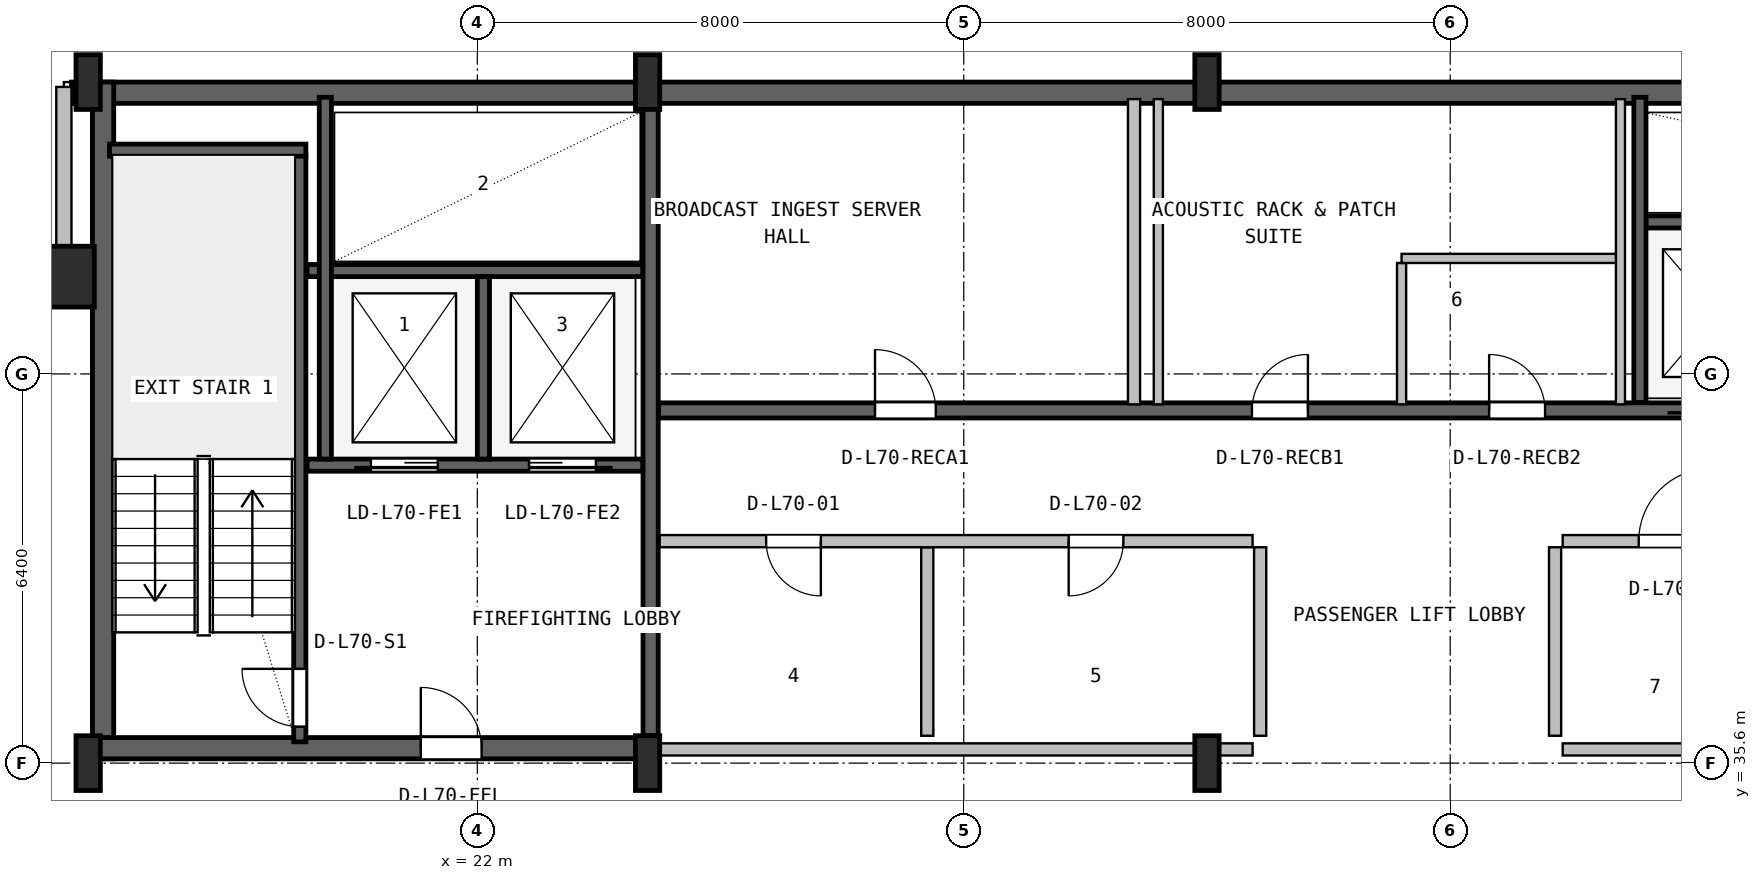
"""IFC4 building model, lengths in metres.
Left out: names, types, materials, properties, quantities, classifications, styles, units other than length and angle.
Written with IfcOpenShell. Run it as: python <this file> out.ifc"""

import sys

from ifc_helpers import new_model, si_unit, direction, frame, frame_2d, origin, origin_2d, place, context, subcontext, project, spatial, rectangle, hollow_rectangle, i_section, extrude, source, transform, mapped, element, fill, save


model = new_model("IFC4")
c1 = context("Model", 3, precision=1e-05, world=origin(), true_north=direction((0.0, 1.0)))
c2 = subcontext(c1, "Body", "Model", "MODEL_VIEW")
j1 = project(units=[si_unit("LENGTHUNIT", "METRE"), si_unit("PLANEANGLEUNIT", "RADIAN")], contexts=[c1])
p1 = place(None, origin())
s1 = spatial("IfcSite", under=j1, at=p1, CompositionType="ELEMENT")
p2 = place(p1, origin())
s2 = spatial("IfcBuilding", under=s1, at=p2, CompositionType="ELEMENT")
p3 = place(p2, frame((0.0, 0.0, 281.2)))
s3 = spatial("IfcBuildingStorey", under=s2, at=p3, CompositionType="ELEMENT", Elevation=281.2)
p4 = place(p3, frame((15.325, 46.625, 0.0), z_axis=(0.0, 0.0, 1.0), x_axis=(1.0, 0.0, 0.0)))
e1 = element("IfcWall", 1, at=p4, inside=s3, PredefinedType="SHEAR", context=c2, shape_type="SweptSolid", body=[
    extrude(rectangle(XDim=37.35, YDim=0.35, at=frame_2d((18.675, 0.0))), origin(), (0.0, 0.0, 1.0), 3.55),
])
p5 = place(p3, frame((15.845, 35.67, 0.0), z_axis=(0.0, 0.0, 1.0), x_axis=(0.0, 1.0, 0.0)))
e2 = element("IfcWall", 2, at=p5, inside=s3, PredefinedType="SHEAR", context=c2, shape_type="SweptSolid", body=[
    extrude(rectangle(XDim=11.13, YDim=0.35, at=frame_2d((5.565, 0.0))), origin(), (0.0, 0.0, 1.0), 3.55),
])
p6 = place(p3, frame((15.67, 35.845, 0.0), z_axis=(0.0, 0.0, 1.0), x_axis=(1.0, 0.0, 0.0)))
e3 = element("IfcWall", 3, at=p6, inside=s3, PredefinedType="SHEAR", context=c2, shape_type="SweptSolid", body=[
    extrude(rectangle(XDim=9.13, YDim=0.35, at=frame_2d((4.565, 0.0))), origin(), (0.0, 0.0, 1.0), 3.55),
])
p7 = place(p6, frame((5.4, 0.0, 0.0)))
e4 = element("IfcOpeningElement", 4, at=p7, cuts=e3, PredefinedType="OPENING", context=c2, shape_type="SweptSolid", body=[
    extrude(rectangle(XDim=1.0, YDim=2.1, at=frame_2d((0.5, 1.05))), frame((0.0, 0.185, 0.0), z_axis=(0.0, -1.0, 0.0), x_axis=(1.0, 0.0, 0.0)), (0.0, 0.0, 1.0), 0.37),
])
m1 = source(origin(), c2, "Body", "SweptSolid", [
    extrude(i_section(OverallWidth=0.4, OverallDepth=0.9, WebThickness=0.016, FlangeThickness=0.028, FilletRadius=0.016, at=origin_2d()), origin(), (0.0, 0.0, 1.0), 3.8),
])
for number, where, z_axis, x_axis in (
    (5, (15.6, 35.6, 0.0), (0.0, 0.0, 1.0), (1.0, 0.0, 0.0)),
    (6, (15.6, 46.8, 0.0), (0.0, 0.0, 1.0), (1.0, 0.0, 0.0)),
    (7, (24.8, 35.6, 0.0), (0.0, 0.0, 1.0), (1.0, 0.0, 0.0)),
    (8, (24.8, 46.8, 0.0), (0.0, 0.0, 1.0), (1.0, 0.0, 0.0)),
    (9, (34.0, 35.6, 0.0), (0.0, 0.0, 1.0), (1.0, 0.0, 0.0)),
    (10, (34.0, 46.8, 0.0), (0.0, 0.0, 1.0), (1.0, 0.0, 0.0)),
):
    element("IfcColumn", number, at=place(p3, frame(where, z_axis=z_axis, x_axis=x_axis)), inside=s3, PredefinedType="COLUMN", context=c2, shape_type="MappedRepresentation", body=[
        mapped(m1, transform((0.0, 0.0, 0.0), x_axis=(1.0, 0.0, 0.0), y_axis=(0.0, 1.0, 0.0), z_axis=(0.0, 0.0, 1.0), scale=1.0)),
    ])
m2 = source(origin(), c2, "Body", "SweptSolid", [
    extrude(hollow_rectangle(XDim=1.0, YDim=1.0, WallThickness=0.04, at=origin_2d()), origin(), (0.0, 0.0, 1.0), 3.8),
])
p8 = place(p3, frame((15.2, 43.6, 0.0), z_axis=(0.0, 0.0, 1.0), x_axis=(1.0, 0.0, 0.0)))
e11 = element("IfcColumn", 11, at=p8, inside=s3, PredefinedType="COLUMN", context=c2, shape_type="MappedRepresentation", body=[
    mapped(m2, transform((0.0, 0.0, 0.0), x_axis=(1.0, 0.0, 0.0), y_axis=(0.0, 1.0, 0.0), z_axis=(0.0, 0.0, 1.0), scale=1.0)),
])
p9 = place(p3, frame((12.08, 43.6, 0.0), z_axis=(0.0, 0.0, 1.0), x_axis=(1.0, 0.0, 0.0)))
e12 = element("IfcWall", 12, at=p9, inside=s3, PredefinedType="SOLIDWALL", context=c2, shape_type="SweptSolid", body=[
    extrude(rectangle(XDim=2.99, YDim=0.25, at=frame_2d((1.495, 0.0))), origin(), (0.0, 0.0, 1.0), 3.53),
])
p10 = place(p3, frame((15.2, 43.52, 0.0), z_axis=(0.0, 0.0, 1.0), x_axis=(0.0, 1.0, 0.0)))
e13 = element("IfcWall", 13, at=p10, inside=s3, PredefinedType="SOLIDWALL", context=c2, shape_type="SweptSolid", body=[
    extrude(rectangle(XDim=3.2, YDim=0.25, at=frame_2d((1.6, 0.0))), origin(), (0.0, 0.0, 1.0), 3.171),
])
p11 = place(p3, frame((19.08, 35.95, 0.0), z_axis=(0.0, 0.0, 1.0), x_axis=(0.0, 1.0, 0.0)))
e14 = element("IfcWall", 14, at=p11, inside=s3, PredefinedType="SHEAR", context=c2, shape_type="SweptSolid", body=[
    extrude(rectangle(XDim=9.65, YDim=0.2, at=frame_2d((4.825, 0.0))), origin(), (0.0, 0.0, 1.0), 3.55),
])
p12 = place(p11, frame((0.25, 0.0, 0.0)))
e15 = element("IfcOpeningElement", 15, at=p12, cuts=e14, PredefinedType="OPENING", context=c2, shape_type="SweptSolid", body=[
    extrude(rectangle(XDim=0.95, YDim=2.1, at=frame_2d((0.475, 1.05))), frame((0.0, 0.11, 0.0), z_axis=(0.0, -1.0, 0.0), x_axis=(1.0, 0.0, 0.0)), (0.0, 0.0, 1.0), 0.22),
])
p13 = place(p3, frame((15.95, 45.68, 0.0), z_axis=(0.0, 0.0, 1.0), x_axis=(1.0, 0.0, 0.0)))
e16 = element("IfcWall", 16, at=p13, inside=s3, PredefinedType="SHEAR", context=c2, shape_type="SweptSolid", body=[
    extrude(rectangle(XDim=3.23, YDim=0.2, at=frame_2d((1.615, 0.0))), origin(), (0.0, 0.0, 1.0), 3.55),
])
p14 = place(p3, frame((24.85, 36.05, 0.0), z_axis=(0.0, 0.0, 1.0), x_axis=(0.0, 1.0, 0.0)))
e17 = element("IfcWall", 17, at=p14, inside=s3, PredefinedType="SHEAR", context=c2, shape_type="SweptSolid", body=[
    extrude(rectangle(XDim=10.45, YDim=0.25, at=frame_2d((5.225, 0.0))), origin(), (0.0, 0.0, 1.0), 3.55),
])
p15 = place(p3, frame((19.2, 40.5, 0.0), z_axis=(0.0, 0.0, 1.0), x_axis=(1.0, 0.0, 0.0)))
e18 = element("IfcWall", 18, at=p15, inside=s3, PredefinedType="SHEAR", context=c2, shape_type="SweptSolid", body=[
    extrude(rectangle(XDim=5.52, YDim=0.2, at=frame_2d((2.76, 0.0))), origin(), (0.0, 0.0, 1.0), 3.55),
])
p16 = place(p15, frame((1.05, 0.0, 0.0)))
e19 = element("IfcOpeningElement", 19, at=p16, cuts=e18, PredefinedType="OPENING", context=c2, shape_type="SweptSolid", body=[
    extrude(rectangle(XDim=1.1, YDim=2.18, at=frame_2d((0.55, 1.09))), frame((0.0, 0.11, 0.0), z_axis=(0.0, -1.0, 0.0), x_axis=(1.0, 0.0, 0.0)), (0.0, 0.0, 1.0), 0.22),
])
p17 = place(p15, frame((3.65, 0.0, 0.0)))
e20 = element("IfcOpeningElement", 20, at=p17, cuts=e18, PredefinedType="OPENING", context=c2, shape_type="SweptSolid", body=[
    extrude(rectangle(XDim=1.1, YDim=2.18, at=frame_2d((0.55, 1.09))), frame((0.0, 0.11, 0.0), z_axis=(0.0, -1.0, 0.0), x_axis=(1.0, 0.0, 0.0)), (0.0, 0.0, 1.0), 0.22),
])
p18 = place(p3, frame((19.2, 43.7, 0.0), z_axis=(0.0, 0.0, 1.0), x_axis=(1.0, 0.0, 0.0)))
e21 = element("IfcWall", 21, at=p18, inside=s3, PredefinedType="SHEAR", context=c2, shape_type="SweptSolid", body=[
    extrude(rectangle(XDim=5.52, YDim=0.2, at=frame_2d((2.76, 0.0))), origin(), (0.0, 0.0, 1.0), 3.55),
])
p19 = place(p3, frame((22.1, 40.6, 0.0), z_axis=(0.0, 0.0, 1.0), x_axis=(0.0, 1.0, 0.0)))
e22 = element("IfcWall", 22, at=p19, inside=s3, PredefinedType="SHEAR", context=c2, shape_type="SweptSolid", body=[
    extrude(rectangle(XDim=3.0, YDim=0.2, at=frame_2d((1.5, 0.0))), origin(), (0.0, 0.0, 1.0), 3.55),
])
p20 = place(p3, frame((19.5, 40.6, 0.0), z_axis=(0.0, 0.0, 1.0), x_axis=(0.0, 1.0, 0.0)))
e23 = element("IfcWall", 23, at=p20, inside=s3, PredefinedType="SHEAR", context=c2, shape_type="SweptSolid", body=[
    extrude(rectangle(XDim=5.95, YDim=0.2, at=frame_2d((2.975, 0.0))), origin(), (0.0, 0.0, 1.0), 3.55),
])
p21 = place(p3, frame((24.98, 41.4, 0.0), z_axis=(0.0, 0.0, 1.0), x_axis=(1.0, 0.0, 0.0)))
e24 = element("IfcWall", 24, at=p21, inside=s3, PredefinedType="SHEAR", context=c2, shape_type="SweptSolid", body=[
    extrude(rectangle(XDim=23.82, YDim=0.25, at=frame_2d((11.91, 0.0))), origin(), (0.0, 0.0, 1.0), 3.55),
])
p22 = place(p21, frame((16.87, 0.0, 0.0)))
e25 = element("IfcOpeningElement", 25, at=p22, cuts=e24, PredefinedType="OPENING", context=c2, shape_type="SweptSolid", body=[
    extrude(rectangle(XDim=1.1, YDim=2.18, at=frame_2d((0.55, 1.09))), frame((0.0, 0.135, 0.0), z_axis=(0.0, -1.0, 0.0), x_axis=(1.0, 0.0, 0.0)), (0.0, 0.0, 1.0), 0.27),
])
p23 = place(p21, frame((19.47, 0.0, 0.0)))
e26 = element("IfcOpeningElement", 26, at=p23, cuts=e24, PredefinedType="OPENING", context=c2, shape_type="SweptSolid", body=[
    extrude(rectangle(XDim=1.1, YDim=2.18, at=frame_2d((0.55, 1.09))), frame((0.0, 0.135, 0.0), z_axis=(0.0, -1.0, 0.0), x_axis=(1.0, 0.0, 0.0)), (0.0, 0.0, 1.0), 0.27),
])
p24 = place(p21, frame((22.07, 0.0, 0.0)))
e27 = element("IfcOpeningElement", 27, at=p24, cuts=e24, PredefinedType="OPENING", context=c2, shape_type="SweptSolid", body=[
    extrude(rectangle(XDim=1.1, YDim=2.18, at=frame_2d((0.55, 1.09))), frame((0.0, 0.135, 0.0), z_axis=(0.0, -1.0, 0.0), x_axis=(1.0, 0.0, 0.0)), (0.0, 0.0, 1.0), 0.27),
])
p25 = place(p21, frame((3.56, 0.0, 0.0)))
e28 = element("IfcOpeningElement", 28, at=p25, cuts=e24, PredefinedType="OPENING", context=c2, shape_type="SweptSolid", body=[
    extrude(rectangle(XDim=1.0, YDim=2.08, at=frame_2d((0.5, 1.04))), frame((0.0, 0.135, 0.0), z_axis=(0.0, -1.0, 0.0), x_axis=(1.0, 0.0, 0.0)), (0.0, 0.0, 1.0), 0.27),
])
p26 = place(p21, frame((9.76, 0.0, 0.0)))
e29 = element("IfcOpeningElement", 29, at=p26, cuts=e24, PredefinedType="OPENING", context=c2, shape_type="SweptSolid", body=[
    extrude(rectangle(XDim=0.92, YDim=2.08, at=frame_2d((0.46, 1.04))), frame((0.0, 0.135, 0.0), z_axis=(0.0, -1.0, 0.0), x_axis=(1.0, 0.0, 0.0)), (0.0, 0.0, 1.0), 0.27),
])
p27 = place(p21, frame((13.66, 0.0, 0.0)))
e30 = element("IfcOpeningElement", 30, at=p27, cuts=e24, PredefinedType="OPENING", context=c2, shape_type="SweptSolid", body=[
    extrude(rectangle(XDim=0.92, YDim=2.08, at=frame_2d((0.46, 1.04))), frame((0.0, 0.135, 0.0), z_axis=(0.0, -1.0, 0.0), x_axis=(1.0, 0.0, 0.0)), (0.0, 0.0, 1.0), 0.27),
])
p28 = place(p3, frame((41.22, 44.5, 0.0), z_axis=(0.0, 0.0, 1.0), x_axis=(1.0, 0.0, 0.0)))
e31 = element("IfcWall", 31, at=p28, inside=s3, PredefinedType="SHEAR", context=c2, shape_type="SweptSolid", body=[
    extrude(rectangle(XDim=7.58, YDim=0.2, at=frame_2d((3.79, 0.0))), origin(), (0.0, 0.0, 1.0), 3.55),
])
p29 = place(p3, frame((41.12, 41.53, 0.0), z_axis=(0.0, 0.0, 1.0), x_axis=(0.0, 1.0, 0.0)))
e32 = element("IfcWall", 32, at=p29, inside=s3, PredefinedType="SHEAR", context=c2, shape_type="SweptSolid", body=[
    extrude(rectangle(XDim=5.02, YDim=0.2, at=frame_2d((2.51, 0.0))), origin(), (0.0, 0.0, 1.0), 3.55),
])
p30 = place(p3, frame((25.0, 35.825, 0.0), z_axis=(0.0, 0.0, 1.0), x_axis=(1.0, 0.0, 0.0)))
e33 = element("IfcWall", 33, at=p30, inside=s3, PredefinedType="PLUMBINGWALL", context=c2, shape_type="SweptSolid", body=[
    extrude(rectangle(XDim=9.75, YDim=0.2, at=frame_2d((4.875, 0.0))), origin(), (0.0, 0.0, 1.0), 2.575),
])
p31 = place(p3, frame((29.4, 36.05, 0.0), z_axis=(0.0, 0.0, 1.0), x_axis=(0.0, 1.0, 0.0)))
e34 = element("IfcWall", 34, at=p31, inside=s3, PredefinedType="PLUMBINGWALL", context=c2, shape_type="SweptSolid", body=[
    extrude(rectangle(XDim=3.1, YDim=0.2, at=frame_2d((1.55, 0.0))), origin(), (0.0, 0.0, 1.0), 3.53),
])
p32 = place(p3, frame((25.0, 39.25, 0.0), z_axis=(0.0, 0.0, 1.0), x_axis=(1.0, 0.0, 0.0)))
e35 = element("IfcWall", 35, at=p32, inside=s3, PredefinedType="PLUMBINGWALL", context=c2, shape_type="SweptSolid", body=[
    extrude(rectangle(XDim=9.75, YDim=0.2, at=frame_2d((4.875, 0.0))), origin(), (0.0, 0.0, 1.0), 3.53),
])
p33 = place(p32, frame((1.75, 0.0, 0.0)))
e36 = element("IfcOpeningElement", 36, at=p33, cuts=e35, PredefinedType="OPENING", context=c2, shape_type="SweptSolid", body=[
    extrude(rectangle(XDim=0.9, YDim=2.06, at=frame_2d((0.45, 1.03))), frame((0.0, 0.11, 0.0), z_axis=(0.0, -1.0, 0.0), x_axis=(1.0, 0.0, 0.0)), (0.0, 0.0, 1.0), 0.22),
])
p34 = place(p32, frame((6.725, 0.0, 0.0)))
e37 = element("IfcOpeningElement", 37, at=p34, cuts=e35, PredefinedType="OPENING", context=c2, shape_type="SweptSolid", body=[
    extrude(rectangle(XDim=0.9, YDim=2.06, at=frame_2d((0.45, 1.03))), frame((0.0, 0.11, 0.0), z_axis=(0.0, -1.0, 0.0), x_axis=(1.0, 0.0, 0.0)), (0.0, 0.0, 1.0), 0.22),
])
p35 = place(p3, frame((34.875, 36.05, 0.0), z_axis=(0.0, 0.0, 1.0), x_axis=(0.0, 1.0, 0.0)))
e38 = element("IfcWall", 38, at=p35, inside=s3, PredefinedType="PLUMBINGWALL", context=c2, shape_type="SweptSolid", body=[
    extrude(rectangle(XDim=3.1, YDim=0.2, at=frame_2d((1.55, 0.0))), origin(), (0.0, 0.0, 1.0), 3.53),
])
p36 = place(p3, frame((39.85, 35.825, 0.0), z_axis=(0.0, 0.0, 1.0), x_axis=(1.0, 0.0, 0.0)))
e39 = element("IfcWall", 39, at=p36, inside=s3, PredefinedType="SOLIDWALL", context=c2, shape_type="SweptSolid", body=[
    extrude(rectangle(XDim=3.7, YDim=0.2, at=frame_2d((1.85, 0.0))), origin(), (0.0, 0.0, 1.0), 2.575),
])
p37 = place(p3, frame((39.85, 39.25, 0.0), z_axis=(0.0, 0.0, 1.0), x_axis=(1.0, 0.0, 0.0)))
e40 = element("IfcWall", 40, at=p37, inside=s3, PredefinedType="SOLIDWALL", context=c2, shape_type="SweptSolid", body=[
    extrude(rectangle(XDim=3.7, YDim=0.2, at=frame_2d((1.85, 0.0))), origin(), (0.0, 0.0, 1.0), 3.53),
])
p38 = place(p37, frame((1.25, 0.0, 0.0)))
e41 = element("IfcOpeningElement", 41, at=p38, cuts=e40, PredefinedType="OPENING", context=c2, shape_type="SweptSolid", body=[
    extrude(rectangle(XDim=1.2, YDim=2.1, at=frame_2d((0.6, 1.05))), frame((0.0, 0.11, 0.0), z_axis=(0.0, -1.0, 0.0), x_axis=(1.0, 0.0, 0.0)), (0.0, 0.0, 1.0), 0.22),
])
p39 = place(p3, frame((39.725, 36.05, 0.0), z_axis=(0.0, 0.0, 1.0), x_axis=(0.0, 1.0, 0.0)))
e42 = element("IfcWall", 42, at=p39, inside=s3, PredefinedType="SOLIDWALL", context=c2, shape_type="SweptSolid", body=[
    extrude(rectangle(XDim=3.1, YDim=0.2, at=frame_2d((1.55, 0.0))), origin(), (0.0, 0.0, 1.0), 3.53),
])
p40 = place(p3, frame((32.8, 41.5, 0.0), z_axis=(0.0, 0.0, 1.0), x_axis=(0.0, 1.0, 0.0)))
e43 = element("IfcWall", 43, at=p40, inside=s3, PredefinedType="SOLIDWALL", context=c2, shape_type="SweptSolid", body=[
    extrude(rectangle(XDim=5.02, YDim=0.2, at=frame_2d((2.51, 0.0))), origin(), (0.0, 0.0, 1.0), 3.53),
])
p41 = place(p3, frame((37.2, 41.5, 0.0), z_axis=(0.0, 0.0, 1.0), x_axis=(0.0, 1.0, 0.0)))
e44 = element("IfcWall", 44, at=p41, inside=s3, PredefinedType="PARTITIONING", context=c2, shape_type="SweptSolid", body=[
    extrude(rectangle(XDim=2.325, YDim=0.15, at=frame_2d((1.163, 0.0))), origin(), (0.0, 0.0, 1.0), 3.53),
])
p42 = place(p3, frame((37.2, 43.9, 0.0), z_axis=(0.0, 0.0, 1.0), x_axis=(1.0, 0.0, 0.0)))
e45 = element("IfcWall", 45, at=p42, inside=s3, PredefinedType="PARTITIONING", context=c2, shape_type="SweptSolid", body=[
    extrude(rectangle(XDim=3.6, YDim=0.15, at=frame_2d((1.8, 0.0))), origin(), (0.0, 0.0, 1.0), 3.53),
])
for number, where, z_axis, x_axis in (
    (46, (40.8, 41.5, 0.0), (0.0, 0.0, 1.0), (0.0, 1.0, 0.0)),
    (47, (33.2, 41.5, 0.0), (0.0, 0.0, 1.0), (0.0, 1.0, 0.0)),
):
    element("IfcWall", number, at=place(p3, frame(where, z_axis=z_axis, x_axis=x_axis)), inside=s3, PredefinedType="PARTITIONING", context=c2, shape_type="SweptSolid", body=[
        extrude(rectangle(XDim=5.02, YDim=0.15, at=frame_2d((2.51, 0.0))), origin(), (0.0, 0.0, 1.0), 3.53),
    ])
m3 = source(origin(), c2, "Body", "SweptSolid", [
    extrude(rectangle(XDim=0.95, YDim=2.1, at=frame_2d((0.475, 1.05))), frame((0.0, 0.025, 0.0), z_axis=(0.0, -1.0, 0.0), x_axis=(1.0, 0.0, 0.0)), (0.0, 0.0, 1.0), 0.05),
])
p43 = place(p12, origin())
e48 = element("IfcDoor", 48, at=p43, inside=s3, OperationType="SINGLE_SWING_RIGHT", PredefinedType="DOOR", context=c2, shape_type="MappedRepresentation", body=[
    mapped(m3, transform((0.0, 0.0, 0.0), x_axis=(1.0, 0.0, 0.0), y_axis=(0.0, 1.0, 0.0), z_axis=(0.0, 0.0, 1.0), scale=1.0)),
])
fill(e15, e48)
m4 = source(origin(), c2, "Body", "SweptSolid", [
    extrude(rectangle(XDim=1.0, YDim=2.1, at=frame_2d((0.5, 1.05))), frame((0.0, 0.025, 0.0), z_axis=(0.0, -1.0, 0.0), x_axis=(1.0, 0.0, 0.0)), (0.0, 0.0, 1.0), 0.05),
])
p44 = place(p7, origin())
e49 = element("IfcDoor", 49, at=p44, inside=s3, OperationType="SINGLE_SWING_LEFT", PredefinedType="DOOR", context=c2, shape_type="MappedRepresentation", body=[
    mapped(m4, transform((0.0, 0.0, 0.0), x_axis=(1.0, 0.0, 0.0), y_axis=(0.0, 1.0, 0.0), z_axis=(0.0, 0.0, 1.0), scale=1.0)),
])
fill(e4, e49)
m5 = source(origin(), c2, "Body", "SweptSolid", [
    extrude(rectangle(XDim=1.1, YDim=2.18, at=frame_2d((0.55, 1.09))), frame((0.0, 0.025, 0.0), z_axis=(0.0, -1.0, 0.0), x_axis=(1.0, 0.0, 0.0)), (0.0, 0.0, 1.0), 0.05),
])
p45 = place(p16, frame((1.1, 0.0, 0.0), z_axis=(0.0, 0.0, 1.0), x_axis=(-1.0, 0.0, 0.0)))
e50 = element("IfcDoor", 50, at=p45, inside=s3, OperationType="SLIDING_TO_LEFT", PredefinedType="DOOR", context=c2, shape_type="MappedRepresentation", body=[
    mapped(m5, transform((0.0, 0.0, 0.0), x_axis=(1.0, 0.0, 0.0), y_axis=(0.0, 1.0, 0.0), z_axis=(0.0, 0.0, 1.0), scale=1.0)),
])
fill(e19, e50)
p46 = place(p17, frame((1.1, 0.0, 0.0), z_axis=(0.0, 0.0, 1.0), x_axis=(-1.0, 0.0, 0.0)))
e51 = element("IfcDoor", 51, at=p46, inside=s3, OperationType="SLIDING_TO_RIGHT", PredefinedType="DOOR", context=c2, shape_type="MappedRepresentation", body=[
    mapped(m5, transform((0.0, 0.0, 0.0), x_axis=(1.0, 0.0, 0.0), y_axis=(0.0, 1.0, 0.0), z_axis=(0.0, 0.0, 1.0), scale=1.0)),
])
fill(e20, e51)
m6 = source(origin(), c2, "Body", "SweptSolid", [
    extrude(rectangle(XDim=1.0, YDim=2.08, at=frame_2d((0.5, 1.04))), frame((0.0, 0.025, 0.0), z_axis=(0.0, -1.0, 0.0), x_axis=(1.0, 0.0, 0.0)), (0.0, 0.0, 1.0), 0.05),
])
p47 = place(p25, origin())
e52 = element("IfcDoor", 52, at=p47, inside=s3, OperationType="SINGLE_SWING_LEFT", PredefinedType="DOOR", context=c2, shape_type="MappedRepresentation", body=[
    mapped(m6, transform((0.0, 0.0, 0.0), x_axis=(1.0, 0.0, 0.0), y_axis=(0.0, 1.0, 0.0), z_axis=(0.0, 0.0, 1.0), scale=1.0)),
])
fill(e28, e52)
m7 = source(origin(), c2, "Body", "SweptSolid", [
    extrude(rectangle(XDim=0.92, YDim=2.08, at=frame_2d((0.46, 1.04))), frame((0.0, 0.025, 0.0), z_axis=(0.0, -1.0, 0.0), x_axis=(1.0, 0.0, 0.0)), (0.0, 0.0, 1.0), 0.05),
])
p48 = place(p26, origin())
e53 = element("IfcDoor", 53, at=p48, inside=s3, OperationType="SINGLE_SWING_RIGHT", PredefinedType="DOOR", context=c2, shape_type="MappedRepresentation", body=[
    mapped(m7, transform((0.0, 0.0, 0.0), x_axis=(1.0, 0.0, 0.0), y_axis=(0.0, 1.0, 0.0), z_axis=(0.0, 0.0, 1.0), scale=1.0)),
])
fill(e29, e53)
p49 = place(p27, origin())
e54 = element("IfcDoor", 54, at=p49, inside=s3, OperationType="SINGLE_SWING_LEFT", PredefinedType="DOOR", context=c2, shape_type="MappedRepresentation", body=[
    mapped(m7, transform((0.0, 0.0, 0.0), x_axis=(1.0, 0.0, 0.0), y_axis=(0.0, 1.0, 0.0), z_axis=(0.0, 0.0, 1.0), scale=1.0)),
])
fill(e30, e54)
m8 = source(origin(), c2, "Body", "SweptSolid", [
    extrude(rectangle(XDim=0.9, YDim=2.06, at=frame_2d((0.45, 1.03))), frame((0.0, 0.025, 0.0), z_axis=(0.0, -1.0, 0.0), x_axis=(1.0, 0.0, 0.0)), (0.0, 0.0, 1.0), 0.05),
])
p50 = place(p33, frame((0.9, 0.0, 0.0), z_axis=(0.0, 0.0, 1.0), x_axis=(-1.0, 0.0, 0.0)))
e55 = element("IfcDoor", 55, at=p50, inside=s3, OperationType="SINGLE_SWING_RIGHT", PredefinedType="DOOR", context=c2, shape_type="MappedRepresentation", body=[
    mapped(m8, transform((0.0, 0.0, 0.0), x_axis=(1.0, 0.0, 0.0), y_axis=(0.0, 1.0, 0.0), z_axis=(0.0, 0.0, 1.0), scale=1.0)),
])
fill(e36, e55)
p51 = place(p34, frame((0.9, 0.0, 0.0), z_axis=(0.0, 0.0, 1.0), x_axis=(-1.0, 0.0, 0.0)))
e56 = element("IfcDoor", 56, at=p51, inside=s3, OperationType="SINGLE_SWING_LEFT", PredefinedType="DOOR", context=c2, shape_type="MappedRepresentation", body=[
    mapped(m8, transform((0.0, 0.0, 0.0), x_axis=(1.0, 0.0, 0.0), y_axis=(0.0, 1.0, 0.0), z_axis=(0.0, 0.0, 1.0), scale=1.0)),
])
fill(e37, e56)
m9 = source(origin(), c2, "Body", "SweptSolid", [
    extrude(rectangle(XDim=1.2, YDim=2.1, at=frame_2d((0.6, 1.05))), frame((0.0, 0.025, 0.0), z_axis=(0.0, -1.0, 0.0), x_axis=(1.0, 0.0, 0.0)), (0.0, 0.0, 1.0), 0.05),
])
p52 = place(p38, origin())
e57 = element("IfcDoor", 57, at=p52, inside=s3, OperationType="SINGLE_SWING_RIGHT", PredefinedType="DOOR", context=c2, shape_type="MappedRepresentation", body=[
    mapped(m9, transform((0.0, 0.0, 0.0), x_axis=(1.0, 0.0, 0.0), y_axis=(0.0, 1.0, 0.0), z_axis=(0.0, 0.0, 1.0), scale=1.0)),
])
fill(e41, e57)
save(model, sys.argv[1])
